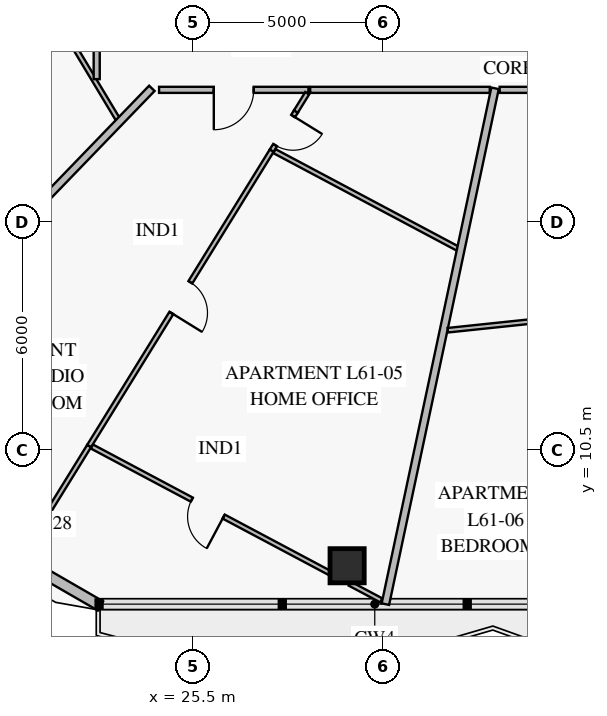
"""IFC4 building model, lengths in metres.
Left out: names, types, materials, properties, quantities, classifications, styles, units other than length and angle.
Written with IfcOpenShell. Run it as: python <this file> out.ifc"""

import sys

from ifc_helpers import new_model, si_unit, direction, frame, frame_2d, origin, origin_2d, place, context, subcontext, project, spatial, rectangle, extrude, element, fill, save


model = new_model("IFC4")
c1 = context("Model", 3, precision=1e-05, world=origin(), true_north=direction((0.0, 1.0)))
c2 = subcontext(c1, "Body", "Model", "MODEL_VIEW")
j1 = project(units=[si_unit("LENGTHUNIT", "METRE"), si_unit("PLANEANGLEUNIT", "RADIAN")], contexts=[c1])
p1 = place(None, origin())
s1 = spatial("IfcSite", under=j1, at=p1, CompositionType="ELEMENT")
p2 = place(p1, origin())
s2 = spatial("IfcBuilding", under=s1, at=p2, CompositionType="ELEMENT")
p3 = place(p2, frame((0.0, 0.0, 242.6)))
s3 = spatial("IfcBuildingStorey", under=s2, at=p3, CompositionType="ELEMENT", Elevation=242.6)
p4 = place(p3, frame((29.559, 7.446, 0.0), z_axis=(0.0, 0.0, 1.0), x_axis=(1.0, 0.0, 0.0)))
e1 = element("IfcColumn", 1, at=p4, inside=s3, PredefinedType="COLUMN", context=c2, shape_type="SweptSolid", body=[
    extrude(rectangle(XDim=0.9, YDim=0.9, at=origin_2d()), origin(), (0.0, 0.0, 1.0), 3.55),
])
p5 = place(p3, frame((23.07, 6.389, 0.0), z_axis=(0.0, 0.0, 1.0), x_axis=(-0.866028773314, 0.499994163758, 0.0)))
e2 = element("IfcWall", 2, at=p5, inside=s3, PredefinedType="SOLIDWALL", context=c2, shape_type="SweptSolid", body=[
    extrude(rectangle(XDim=3.215, YDim=0.28, at=frame_2d((1.607, 0.0))), origin(), (0.0, 0.0, 1.0), 3.55),
])
p6 = place(p3, frame((28.212, 19.4, 0.0), z_axis=(0.0, 0.0, 1.0), x_axis=(-0.525724166979, -0.850655100646, 0.0)))
e3 = element("IfcWall", 3, at=p6, inside=s3, PredefinedType="PARTITIONING", context=c2, shape_type="SweptSolid", body=[
    extrude(rectangle(XDim=1.213, YDim=0.12, at=frame_2d((0.607, 0.0))), origin(), (0.0, 0.0, 1.0), 3.55),
])
p7 = place(p6, frame((0.14, 0.0, 0.0)))
e4 = element("IfcOpeningElement", 4, at=p7, cuts=e3, PredefinedType="OPENING", context=c2, shape_type="SweptSolid", body=[
    extrude(rectangle(XDim=0.9, YDim=2.1, at=frame_2d((0.45, 1.05))), frame((0.0, 0.072, 0.0), z_axis=(0.0, -1.0, 0.0), x_axis=(1.0, 0.0, 0.0)), (0.0, 0.0, 1.0), 0.144),
])
p8 = place(p3, frame((27.574, 18.368, 0.0), z_axis=(0.0, 0.0, 1.0), x_axis=(-0.525774998316, -0.850623683626, 0.0)))
e5 = element("IfcWall", 5, at=p8, inside=s3, PredefinedType="PARTITIONING", context=c2, shape_type="SweptSolid", body=[
    extrude(rectangle(XDim=9.137, YDim=0.12, at=frame_2d((4.569, 0.0))), origin(), (0.0, 0.0, 1.0), 2.93),
])
p9 = place(p8, frame((4.069, 0.0, 0.0)))
e6 = element("IfcOpeningElement", 6, at=p9, cuts=e5, PredefinedType="OPENING", context=c2, shape_type="SweptSolid", body=[
    extrude(rectangle(XDim=0.95, YDim=2.1, at=frame_2d((0.475, 1.05))), frame((0.0, 0.072, 0.0), z_axis=(0.0, -1.0, 0.0), x_axis=(1.0, 0.0, 0.0)), (0.0, 0.0, 1.0), 0.144),
])
p10 = place(p3, frame((22.843, 10.584, 0.0), z_axis=(0.0, 0.0, 1.0), x_axis=(0.882936922094, -0.469491631026, 0.0)))
e7 = element("IfcWall", 7, at=p10, inside=s3, PredefinedType="PARTITIONING", context=c2, shape_type="SweptSolid", body=[
    extrude(rectangle(XDim=7.074, YDim=0.12, at=frame_2d((3.537, 0.0))), origin(), (0.0, 0.0, 1.0), 3.55),
])
p11 = place(p10, frame((2.978, 0.0, 0.0)))
e8 = element("IfcOpeningElement", 8, at=p11, cuts=e7, PredefinedType="OPENING", context=c2, shape_type="SweptSolid", body=[
    extrude(rectangle(XDim=0.95, YDim=2.1, at=frame_2d((0.475, 1.05))), frame((0.0, 0.072, 0.0), z_axis=(0.0, -1.0, 0.0), x_axis=(1.0, 0.0, 0.0)), (0.0, 0.0, 1.0), 0.144),
])
p12 = place(p3, frame((24.612, 19.97, 0.0), z_axis=(0.0, 0.0, 1.0), x_axis=(1.0, 0.0, 0.0)))
e9 = element("IfcWall", 9, at=p12, inside=s3, PredefinedType="PARTITIONING", context=c2, shape_type="SweptSolid", body=[
    extrude(rectangle(XDim=3.929, YDim=0.16, at=frame_2d((1.965, 0.0))), origin(), (0.0, 0.0, 1.0), 3.55),
])
p13 = place(p12, frame((1.44, 0.0, 0.0)))
e10 = element("IfcOpeningElement", 10, at=p13, cuts=e9, PredefinedType="OPENING", context=c2, shape_type="SweptSolid", body=[
    extrude(rectangle(XDim=1.05, YDim=2.15, at=frame_2d((0.525, 1.075))), frame((0.0, 0.092, 0.0), z_axis=(0.0, -1.0, 0.0), x_axis=(1.0, 0.0, 0.0)), (0.0, 0.0, 1.0), 0.184),
])
p14 = place(p3, frame((20.675, 23.939, 0.0), z_axis=(0.0, 0.0, 1.0), x_axis=(0.515057714927, -0.857155499483, 0.0)))
e11 = element("IfcWall", 11, at=p14, inside=s3, PredefinedType="PARTITIONING", context=c2, shape_type="SweptSolid", body=[
    extrude(rectangle(XDim=5.557, YDim=0.12, at=frame_2d((2.779, 0.0))), origin(), (0.0, 0.0, 1.0), 2.95),
])
p15 = place(p3, frame((24.421, 20.01, 0.0), z_axis=(0.0, 0.0, 1.0), x_axis=(-0.694650551067, -0.719347351355, 0.0)))
e12 = element("IfcWall", 12, at=p15, inside=s3, PredefinedType="PARTITIONING", context=c2, shape_type="SweptSolid", body=[
    extrude(rectangle(XDim=8.63, YDim=0.2, at=frame_2d((4.315, 0.0))), origin(), (0.0, 0.0, 1.0), 2.93),
])
p16 = place(p3, frame((28.51, 19.882, 0.0), z_axis=(0.0, 0.0, 1.0), x_axis=(-0.525850424149, -0.850577057898, 0.0)))
e13 = element("IfcWall", 13, at=p16, inside=s3, PredefinedType="PARTITIONING", context=c2, shape_type="SweptSolid", body=[
    extrude(rectangle(XDim=0.567, YDim=0.12, at=frame_2d((0.283, 0.0))), origin(), (0.0, 0.0, 1.0), 3.55),
])
p17 = place(p3, frame((22.77, 10.595, 0.0), z_axis=(0.0, 0.0, 1.0), x_axis=(-0.525761118402, -0.850632262718, 0.0)))
e14 = element("IfcWall", 14, at=p17, inside=s3, PredefinedType="PARTITIONING", context=c2, shape_type="SweptSolid", body=[
    extrude(rectangle(XDim=3.74, YDim=0.12, at=frame_2d((1.87, 0.0))), origin(), (0.0, 0.0, 1.0), 3.55),
])
p18 = place(p3, frame((27.647, 18.357, 0.0), z_axis=(0.0, 0.0, 1.0), x_axis=(0.882946751735, -0.469473144706, 0.0)))
e15 = element("IfcWall", 15, at=p18, inside=s3, PredefinedType="PARTITIONING", context=c2, shape_type="SweptSolid", body=[
    extrude(rectangle(XDim=5.502, YDim=0.12, at=frame_2d((2.751, 0.0))), origin(), (0.0, 0.0, 1.0), 2.95),
])
p19 = place(p3, frame((29.629, 6.976, 0.0), z_axis=(0.0, 0.0, 1.0), x_axis=(0.883014643107, -0.46934543788, 0.0)))
e16 = element("IfcWall", 16, at=p19, inside=s3, PredefinedType="PARTITIONING", context=c2, shape_type="SweptSolid", body=[
    extrude(rectangle(XDim=0.938, YDim=0.12, at=frame_2d((0.469, 0.0))), origin(), (0.0, 0.0, 1.0), 3.55),
])
p20 = place(p3, frame((33.451, 20.01, 0.0), z_axis=(0.0, 0.0, 1.0), x_axis=(-0.207899576005, -0.978150175738, 0.0)))
e17 = element("IfcWall", 17, at=p20, inside=s3, PredefinedType="PARTITIONING", context=c2, shape_type="SweptSolid", body=[
    extrude(rectangle(XDim=13.877, YDim=0.2, at=frame_2d((6.938, 0.0))), origin(), (0.0, 0.0, 1.0), 2.93),
])
p21 = place(p3, frame((32.209, 13.645, 0.0), z_axis=(0.0, 0.0, 1.0), x_axis=(0.99452169774, 0.10453034356, 0.0)))
e18 = element("IfcWall", 18, at=p21, inside=s3, PredefinedType="PARTITIONING", context=c2, shape_type="SweptSolid", body=[
    extrude(rectangle(XDim=3.538, YDim=0.12, at=frame_2d((1.769, 0.0))), origin(), (0.0, 0.0, 1.0), 3.55),
])
p22 = place(p3, frame((22.97, 25.135, 0.0), z_axis=(0.0, 0.0, 1.0), x_axis=(0.0, -1.0, 0.0)))
e19 = element("IfcWall", 19, at=p22, inside=s3, PredefinedType="PARTITIONING", context=c2, shape_type="SweptSolid", body=[
    extrude(rectangle(XDim=4.883, YDim=0.16, at=frame_2d((2.441, 0.0))), origin(), (0.0, 0.0, 1.0), 3.55),
])
p23 = place(p3, frame((28.588, 19.97, 0.0), z_axis=(0.0, 0.0, 1.0), x_axis=(1.0, 0.0, 0.0)))
e20 = element("IfcWall", 20, at=p23, inside=s3, PredefinedType="PARTITIONING", context=c2, shape_type="SweptSolid", body=[
    extrude(rectangle(XDim=4.725, YDim=0.16, at=frame_2d((2.362, 0.0))), origin(), (0.0, 0.0, 1.0), 2.95),
])
p24 = place(p3, frame((33.573, 19.97, 0.0), z_axis=(0.0, 0.0, 1.0), x_axis=(1.0, 0.0, 0.0)))
e21 = element("IfcWall", 21, at=p24, inside=s3, PredefinedType="PARTITIONING", context=c2, shape_type="SweptSolid", body=[
    extrude(rectangle(XDim=1.059, YDim=0.16, at=frame_2d((0.53, 0.0))), origin(), (0.0, 0.0, 1.0), 3.55),
])
p25 = place(p7, origin())
e22 = element("IfcDoor", 22, at=p25, inside=s3, OperationType="SINGLE_SWING_LEFT", PredefinedType="DOOR", context=c2, shape_type="SweptSolid", body=[
    extrude(rectangle(XDim=0.9, YDim=2.1, at=frame_2d((0.45, 1.05))), frame((0.0, 0.025, 0.0), z_axis=(0.0, -1.0, 0.0), x_axis=(1.0, 0.0, 0.0)), (0.0, 0.0, 1.0), 0.05),
])
fill(e4, e22)
p26 = place(p9, origin())
e23 = element("IfcDoor", 23, at=p26, inside=s3, OperationType="SINGLE_SWING_RIGHT", PredefinedType="DOOR", context=c2, shape_type="SweptSolid", body=[
    extrude(rectangle(XDim=0.95, YDim=2.1, at=frame_2d((0.475, 1.05))), frame((0.0, 0.025, 0.0), z_axis=(0.0, -1.0, 0.0), x_axis=(1.0, 0.0, 0.0)), (0.0, 0.0, 1.0), 0.05),
])
fill(e6, e23)
p27 = place(p11, frame((0.95, 0.0, 0.0), z_axis=(0.0, 0.0, 1.0), x_axis=(-1.0, 0.0, 0.0)))
e24 = element("IfcDoor", 24, at=p27, inside=s3, OperationType="SINGLE_SWING_LEFT", PredefinedType="DOOR", context=c2, shape_type="SweptSolid", body=[
    extrude(rectangle(XDim=0.95, YDim=2.1, at=frame_2d((0.475, 1.05))), frame((0.0, 0.025, 0.0), z_axis=(0.0, -1.0, 0.0), x_axis=(1.0, 0.0, 0.0)), (0.0, 0.0, 1.0), 0.05),
])
fill(e8, e24)
p28 = place(p13, frame((1.05, 0.0, 0.0), z_axis=(0.0, 0.0, 1.0), x_axis=(-1.0, 0.0, 0.0)))
e25 = element("IfcDoor", 25, at=p28, inside=s3, OperationType="SINGLE_SWING_RIGHT", PredefinedType="DOOR", context=c2, shape_type="SweptSolid", body=[
    extrude(rectangle(XDim=1.05, YDim=2.15, at=frame_2d((0.525, 1.075))), frame((0.0, 0.025, 0.0), z_axis=(0.0, -1.0, 0.0), x_axis=(1.0, 0.0, 0.0)), (0.0, 0.0, 1.0), 0.05),
])
fill(e10, e25)
save(model, sys.argv[1])
